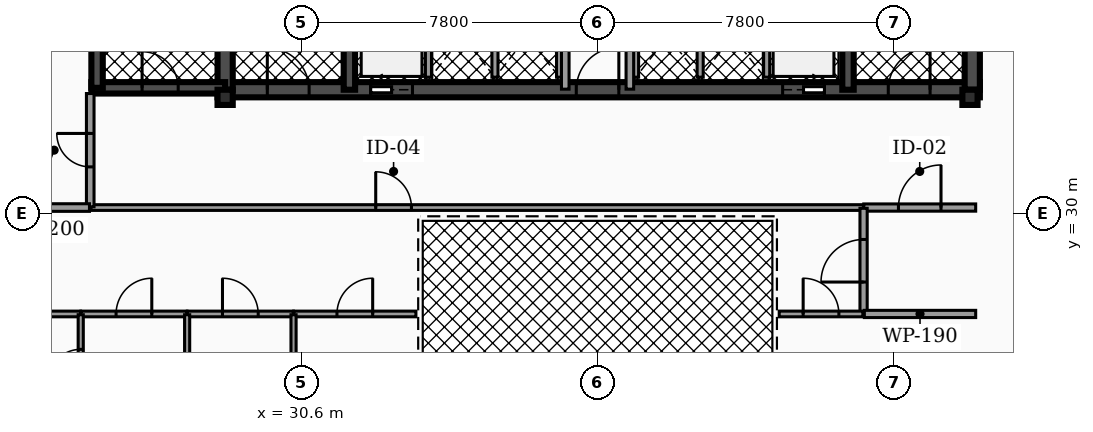
"""IFC4 building model, lengths in metres.
Left out: names, types, materials, properties, quantities, classifications, styles, units other than length and angle.
Written with IfcOpenShell. Run it as: python <this file> out.ifc"""

import sys

from ifc_helpers import new_model, si_unit, direction, frame, frame_2d, origin, origin_2d, place, context, subcontext, project, spatial, rectangle, hollow_rectangle, extrude, element, fill, save


model = new_model("IFC4")
c1 = context("Model", 3, precision=1e-05, world=origin(), true_north=direction((0.0, 1.0)))
c2 = subcontext(c1, "Body", "Model", "MODEL_VIEW")
j1 = project(units=[si_unit("LENGTHUNIT", "METRE"), si_unit("PLANEANGLEUNIT", "RADIAN")], contexts=[c1])
p1 = place(None, origin())
s1 = spatial("IfcSite", under=j1, at=p1, CompositionType="ELEMENT")
p2 = place(p1, origin())
s2 = spatial("IfcBuilding", under=s1, at=p2, CompositionType="ELEMENT")
p3 = place(p2, frame((0.0, 0.0, 18.36)))
s3 = spatial("IfcBuildingStorey", under=s2, at=p3, CompositionType="ELEMENT", Elevation=18.36)
p4 = place(p3, frame((28.4, 33.25, 0.0), z_axis=(0.0, 0.0, 1.0), x_axis=(1.0, 0.0, 0.0)))
e1 = element("IfcWall", 1, at=p4, inside=s3, PredefinedType="SHEAR", context=c2, shape_type="SweptSolid", body=[
    extrude(rectangle(XDim=20.06, YDim=0.4, at=frame_2d((10.03, 0.0))), origin(), (0.0, 0.0, 1.0), 4.07),
])
p5 = place(p4, frame((4.03, 0.0, 0.0)))
e2 = element("IfcOpeningElement", 2, at=p5, cuts=e1, PredefinedType="OPENING", context=c2, shape_type="SweptSolid", body=[
    extrude(rectangle(XDim=1.1, YDim=2.15, at=frame_2d((0.55, 1.075))), frame((0.0, 0.21, 0.0), z_axis=(0.0, -1.0, 0.0), x_axis=(1.0, 0.0, 0.0)), (0.0, 0.0, 1.0), 0.42),
])
p6 = place(p4, frame((14.87, 0.0, 0.0)))
e3 = element("IfcOpeningElement", 3, at=p6, cuts=e1, PredefinedType="OPENING", context=c2, shape_type="SweptSolid", body=[
    extrude(rectangle(XDim=1.1, YDim=2.15, at=frame_2d((0.55, 1.075))), frame((0.0, 0.21, 0.0), z_axis=(0.0, -1.0, 0.0), x_axis=(1.0, 0.0, 0.0)), (0.0, 0.0, 1.0), 0.42),
])
p7 = place(p4, frame((1.31, 0.0, 0.0)))
e4 = element("IfcOpeningElement", 4, at=p7, cuts=e1, PredefinedType="OPENING", context=c2, shape_type="SweptSolid", body=[
    extrude(rectangle(XDim=1.1, YDim=2.2, at=frame_2d((0.55, 1.1))), frame((0.0, 0.21, 0.0), z_axis=(0.0, -1.0, 0.0), x_axis=(1.0, 0.0, 0.0)), (0.0, 0.0, 1.0), 0.42),
])
p8 = place(p4, frame((9.44, 0.0, 0.0)))
e5 = element("IfcOpeningElement", 5, at=p8, cuts=e1, PredefinedType="OPENING", context=c2, shape_type="SweptSolid", body=[
    extrude(rectangle(XDim=1.12, YDim=2.05, at=frame_2d((0.56, 1.025))), frame((0.0, 0.21, 0.0), z_axis=(0.0, -1.0, 0.0), x_axis=(1.0, 0.0, 0.0)), (0.0, 0.0, 1.0), 0.42),
])
p9 = place(p4, frame((17.65, 0.0, 0.0)))
e6 = element("IfcOpeningElement", 6, at=p9, cuts=e1, PredefinedType="OPENING", context=c2, shape_type="SweptSolid", body=[
    extrude(rectangle(XDim=1.1, YDim=2.2, at=frame_2d((0.55, 1.1))), frame((0.0, 0.21, 0.0), z_axis=(0.0, -1.0, 0.0), x_axis=(1.0, 0.0, 0.0)), (0.0, 0.0, 1.0), 0.42),
])
p10 = place(p3, frame((28.6, 33.25, 0.0), z_axis=(0.0, 0.0, 1.0), x_axis=(0.0, 1.0, 0.0)))
e7 = element("IfcWall", 7, at=p10, inside=s3, PredefinedType="SHEAR", context=c2, shape_type="SweptSolid", body=[
    extrude(rectangle(XDim=10.2, YDim=0.4, at=frame_2d((5.1, 0.0))), origin(), (0.0, 0.0, 1.0), 4.07),
])
for number, where, z_axis, x_axis in (
    (8, (31.87, 33.25, 0.0), (0.0, 0.0, 1.0), (0.0, 1.0, 0.0)),
    (9, (44.99, 33.25, 0.0), (0.0, 0.0, 1.0), (0.0, 1.0, 0.0)),
):
    element("IfcWall", number, at=place(p3, frame(where, z_axis=z_axis, x_axis=x_axis)), inside=s3, PredefinedType="SHEAR", context=c2, shape_type="SweptSolid", body=[
        extrude(rectangle(XDim=10.2, YDim=0.3, at=frame_2d((5.1, 0.0))), origin(), (0.0, 0.0, 1.0), 4.07),
    ])
p11 = place(p3, frame((48.26, 33.25, 0.0), z_axis=(0.0, 0.0, 1.0), x_axis=(0.0, 1.0, 0.0)))
e10 = element("IfcWall", 10, at=p11, inside=s3, PredefinedType="SHEAR", context=c2, shape_type="SweptSolid", body=[
    extrude(rectangle(XDim=10.2, YDim=0.4, at=frame_2d((5.1, 0.0))), origin(), (0.0, 0.0, 1.0), 4.07),
])
p12 = place(p3, frame((25.08, 33.3, 0.0), z_axis=(0.0, 0.0, 1.0), x_axis=(1.0, 0.0, 0.0)))
e11 = element("IfcWall", 11, at=p12, inside=s3, PredefinedType="SHEAR", context=c2, shape_type="SweptSolid", body=[
    extrude(rectangle(XDim=3.52, YDim=0.3, at=frame_2d((1.76, 0.0))), origin(), (0.0, 0.0, 1.0), 4.07),
])
p13 = place(p12, frame((1.335, 0.0, 0.0)))
e12 = element("IfcOpeningElement", 12, at=p13, cuts=e11, PredefinedType="OPENING", context=c2, shape_type="SweptSolid", body=[
    extrude(rectangle(XDim=0.95, YDim=2.2, at=frame_2d((0.475, 1.1))), frame((0.0, 0.16, 0.0), z_axis=(0.0, -1.0, 0.0), x_axis=(1.0, 0.0, 0.0)), (0.0, 0.0, 1.0), 0.32),
])
p14 = place(p3, frame((25.23, 33.3, 0.0), z_axis=(0.0, 0.0, 1.0), x_axis=(0.0, 1.0, 0.0)))
e13 = element("IfcWall", 13, at=p14, inside=s3, PredefinedType="SHEAR", context=c2, shape_type="SweptSolid", body=[
    extrude(rectangle(XDim=7.6, YDim=0.3, at=frame_2d((3.8, 0.0))), origin(), (0.0, 0.0, 1.0), 4.07),
])
for number, where, z_axis, x_axis in (
    (14, (28.6, 33.05, 0.0), (0.0, 0.0, 1.0), (1.0, 0.0, 0.0)),
    (15, (48.2, 33.05, 0.0), (0.0, 0.0, 1.0), (1.0, 0.0, 0.0)),
):
    element("IfcColumn", number, at=place(p3, frame(where, z_axis=z_axis, x_axis=x_axis)), inside=s3, PredefinedType="PILASTER", context=c2, shape_type="SweptSolid", body=[
        extrude(hollow_rectangle(XDim=0.4, YDim=0.4, WallThickness=0.02, at=origin_2d()), origin(), (0.0, 0.0, 1.0), 4.07),
    ])
for number, where, z_axis, x_axis in (
    (16, (33.95, 33.58, 0.0), (0.0, 0.0, 1.0), (0.0, 1.0, 0.0)),
    (17, (42.85, 33.58, 0.0), (0.0, 0.0, 1.0), (0.0, 1.0, 0.0)),
):
    element("IfcWall", number, at=place(p3, frame(where, z_axis=z_axis, x_axis=x_axis)), inside=s3, PredefinedType="SOLIDWALL", context=c2, shape_type="SweptSolid", body=[
        extrude(rectangle(XDim=2.45, YDim=0.16, at=frame_2d((1.225, 0.0))), origin(), (0.0, 0.0, 1.0), 3.042),
    ])
for number, where, z_axis, x_axis in (
    (18, (35.7, 33.58, 0.0), (0.0, 0.0, 1.0), (0.0, 1.0, 0.0)),
    (19, (37.4, 33.58, 0.0), (0.0, 0.0, 1.0), (0.0, 1.0, 0.0)),
    (20, (39.4, 33.58, 0.0), (0.0, 0.0, 1.0), (0.0, 1.0, 0.0)),
    (21, (41.1, 33.58, 0.0), (0.0, 0.0, 1.0), (0.0, 1.0, 0.0)),
):
    element("IfcWall", number, at=place(p3, frame(where, z_axis=z_axis, x_axis=x_axis)), inside=s3, PredefinedType="SOLIDWALL", context=c2, shape_type="SweptSolid", body=[
        extrude(rectangle(XDim=2.25, YDim=0.16, at=frame_2d((1.125, 0.0))), origin(), (0.0, 0.0, 1.0), 3.042),
    ])
p15 = place(p3, frame((37.55, 33.265, 0.0), z_axis=(0.0, 0.0, 1.0), x_axis=(0.0, 1.0, 0.0)))
e22 = element("IfcWall", 22, at=p15, inside=s3, PredefinedType="PARTITIONING", context=c2, shape_type="SweptSolid", body=[
    extrude(rectangle(XDim=4.265, YDim=0.2, at=frame_2d((2.133, 0.0))), origin(), (0.0, 0.0, 1.0), 3.027),
])
p16 = place(p15, frame((3.093, 0.0, 0.0)))
e23 = element("IfcOpeningElement", 23, at=p16, cuts=e22, PredefinedType="OPENING", context=c2, shape_type="SweptSolid", body=[
    extrude(rectangle(XDim=0.88, YDim=2.05, at=frame_2d((0.44, 1.025))), frame((0.0, 0.11, 0.0), z_axis=(0.0, -1.0, 0.0), x_axis=(1.0, 0.0, 0.0)), (0.0, 0.0, 1.0), 0.22),
])
p17 = place(p3, frame((39.25, 33.265, 0.0), z_axis=(0.0, 0.0, 1.0), x_axis=(0.0, 1.0, 0.0)))
e24 = element("IfcWall", 24, at=p17, inside=s3, PredefinedType="PARTITIONING", context=c2, shape_type="SweptSolid", body=[
    extrude(rectangle(XDim=4.265, YDim=0.2, at=frame_2d((2.133, 0.0))), origin(), (0.0, 0.0, 1.0), 3.027),
])
p18 = place(p17, frame((3.093, 0.0, 0.0)))
e25 = element("IfcOpeningElement", 25, at=p18, cuts=e24, PredefinedType="OPENING", context=c2, shape_type="SweptSolid", body=[
    extrude(rectangle(XDim=0.88, YDim=2.05, at=frame_2d((0.44, 1.025))), frame((0.0, 0.11, 0.0), z_axis=(0.0, -1.0, 0.0), x_axis=(1.0, 0.0, 0.0)), (0.0, 0.0, 1.0), 0.22),
])
p19 = place(p3, frame((45.405, 30.15, 0.0), z_axis=(0.0, 0.0, 1.0), x_axis=(1.0, 0.0, 0.0)))
e26 = element("IfcWall", 26, at=p19, inside=s3, PredefinedType="PARTITIONING", context=c2, shape_type="SweptSolid", body=[
    extrude(rectangle(XDim=2.945, YDim=0.19, at=frame_2d((1.473, 0.0))), origin(), (0.0, 0.0, 1.0), 3.027),
])
p20 = place(p19, frame((0.913, 0.0, 0.0)))
e27 = element("IfcOpeningElement", 27, at=p20, cuts=e26, PredefinedType="OPENING", context=c2, shape_type="SweptSolid", body=[
    extrude(rectangle(XDim=1.12, YDim=2.05, at=frame_2d((0.56, 1.025))), frame((0.0, 0.105, 0.0), z_axis=(0.0, -1.0, 0.0), x_axis=(1.0, 0.0, 0.0)), (0.0, 0.0, 1.0), 0.21),
])
p21 = place(p3, frame((25.07, 30.15, 0.0), z_axis=(0.0, 0.0, 1.0), x_axis=(1.0, 0.0, 0.0)))
e28 = element("IfcWall", 28, at=p21, inside=s3, PredefinedType="PARTITIONING", context=c2, shape_type="SweptSolid", body=[
    extrude(rectangle(XDim=20.325, YDim=0.15, at=frame_2d((10.163, 0.0))), origin(), (0.0, 0.0, 1.0), 3.027),
])
p22 = place(p21, frame((7.492, 0.0, 0.0)))
e29 = element("IfcOpeningElement", 29, at=p22, cuts=e28, PredefinedType="OPENING", context=c2, shape_type="SweptSolid", body=[
    extrude(rectangle(XDim=0.94, YDim=2.05, at=frame_2d((0.47, 1.025))), frame((0.0, 0.085, 0.0), z_axis=(0.0, -1.0, 0.0), x_axis=(1.0, 0.0, 0.0)), (0.0, 0.0, 1.0), 0.17),
])
p23 = place(p3, frame((25.05, 30.17, 0.0), z_axis=(0.0, 0.0, 1.0), x_axis=(0.0, 1.0, 0.0)))
e30 = element("IfcWall", 30, at=p23, inside=s3, PredefinedType="PARTITIONING", context=c2, shape_type="SweptSolid", body=[
    extrude(rectangle(XDim=2.98, YDim=0.2, at=frame_2d((1.49, 0.0))), origin(), (0.0, 0.0, 1.0), 3.027),
])
p24 = place(p23, frame((1.05, 0.0, 0.0)))
e31 = element("IfcOpeningElement", 31, at=p24, cuts=e30, PredefinedType="OPENING", context=c2, shape_type="SweptSolid", body=[
    extrude(rectangle(XDim=0.88, YDim=2.05, at=frame_2d((0.44, 1.025))), frame((0.0, 0.11, 0.0), z_axis=(0.0, -1.0, 0.0), x_axis=(1.0, 0.0, 0.0)), (0.0, 0.0, 1.0), 0.22),
])
p25 = place(p3, frame((45.4, 27.37, 0.0), z_axis=(0.0, 0.0, 1.0), x_axis=(0.0, 1.0, 0.0)))
e32 = element("IfcWall", 32, at=p25, inside=s3, PredefinedType="PARTITIONING", context=c2, shape_type="SweptSolid", body=[
    extrude(rectangle(XDim=2.76, YDim=0.19, at=frame_2d((1.38, 0.0))), origin(), (0.0, 0.0, 1.0), 3.027),
])
p26 = place(p25, frame((0.82, 0.0, 0.0)))
e33 = element("IfcOpeningElement", 33, at=p26, cuts=e32, PredefinedType="OPENING", context=c2, shape_type="SweptSolid", body=[
    extrude(rectangle(XDim=1.12, YDim=2.05, at=frame_2d((0.56, 1.025))), frame((0.0, 0.105, 0.0), z_axis=(0.0, -1.0, 0.0), x_axis=(1.0, 0.0, 0.0)), (0.0, 0.0, 1.0), 0.21),
])
p27 = place(p3, frame((45.42, 27.35, 0.0), z_axis=(0.0, 0.0, 1.0), x_axis=(1.0, 0.0, 0.0)))
e34 = element("IfcWall", 34, at=p27, inside=s3, PredefinedType="PARTITIONING", context=c2, shape_type="SweptSolid", body=[
    extrude(rectangle(XDim=2.93, YDim=0.19, at=frame_2d((1.465, 0.0))), origin(), (0.0, 0.0, 1.0), 3.027),
])
p28 = place(p3, frame((22.8, 27.35, 0.0), z_axis=(0.0, 0.0, 1.0), x_axis=(1.0, 0.0, 0.0)))
e35 = element("IfcWall", 35, at=p28, inside=s3, PredefinedType="PARTITIONING", context=c2, shape_type="SweptSolid", body=[
    extrude(rectangle(XDim=1.995, YDim=0.15, at=frame_2d((0.998, 0.0))), origin(), (0.0, 0.0, 1.0), 3.027),
])
p29 = place(p3, frame((24.805, 27.35, 0.0), z_axis=(0.0, 0.0, 1.0), x_axis=(1.0, 0.0, 0.0)))
e36 = element("IfcWall", 36, at=p29, inside=s3, PredefinedType="PARTITIONING", context=c2, shape_type="SweptSolid", body=[
    extrude(rectangle(XDim=2.79, YDim=0.15, at=frame_2d((1.395, 0.0))), origin(), (0.0, 0.0, 1.0), 3.027),
])
p30 = place(p29, frame((0.925, 0.0, 0.0)))
e37 = element("IfcOpeningElement", 37, at=p30, cuts=e36, PredefinedType="OPENING", context=c2, shape_type="SweptSolid", body=[
    extrude(rectangle(XDim=0.94, YDim=2.05, at=frame_2d((0.47, 1.025))), frame((0.0, 0.085, 0.0), z_axis=(0.0, -1.0, 0.0), x_axis=(1.0, 0.0, 0.0)), (0.0, 0.0, 1.0), 0.17),
])
p31 = place(p3, frame((27.605, 27.35, 0.0), z_axis=(0.0, 0.0, 1.0), x_axis=(1.0, 0.0, 0.0)))
e38 = element("IfcWall", 38, at=p31, inside=s3, PredefinedType="PARTITIONING", context=c2, shape_type="SweptSolid", body=[
    extrude(rectangle(XDim=2.79, YDim=0.15, at=frame_2d((1.395, 0.0))), origin(), (0.0, 0.0, 1.0), 3.027),
])
p32 = place(p31, frame((0.925, 0.0, 0.0)))
e39 = element("IfcOpeningElement", 39, at=p32, cuts=e38, PredefinedType="OPENING", context=c2, shape_type="SweptSolid", body=[
    extrude(rectangle(XDim=0.94, YDim=2.05, at=frame_2d((0.47, 1.025))), frame((0.0, 0.085, 0.0), z_axis=(0.0, -1.0, 0.0), x_axis=(1.0, 0.0, 0.0)), (0.0, 0.0, 1.0), 0.17),
])
p33 = place(p3, frame((30.405, 27.35, 0.0), z_axis=(0.0, 0.0, 1.0), x_axis=(1.0, 0.0, 0.0)))
e40 = element("IfcWall", 40, at=p33, inside=s3, PredefinedType="PARTITIONING", context=c2, shape_type="SweptSolid", body=[
    extrude(rectangle(XDim=3.215, YDim=0.15, at=frame_2d((1.607, 0.0))), origin(), (0.0, 0.0, 1.0), 3.027),
])
p34 = place(p33, frame((1.137, 0.0, 0.0)))
e41 = element("IfcOpeningElement", 41, at=p34, cuts=e40, PredefinedType="OPENING", context=c2, shape_type="SweptSolid", body=[
    extrude(rectangle(XDim=0.94, YDim=2.05, at=frame_2d((0.47, 1.025))), frame((0.0, 0.085, 0.0), z_axis=(0.0, -1.0, 0.0), x_axis=(1.0, 0.0, 0.0)), (0.0, 0.0, 1.0), 0.17),
])
p35 = place(p3, frame((43.18, 27.35, 0.0), z_axis=(0.0, 0.0, 1.0), x_axis=(1.0, 0.0, 0.0)))
e42 = element("IfcWall", 42, at=p35, inside=s3, PredefinedType="PARTITIONING", context=c2, shape_type="SweptSolid", body=[
    extrude(rectangle(XDim=2.2, YDim=0.15, at=frame_2d((1.1, 0.0))), origin(), (0.0, 0.0, 1.0), 3.027),
])
p36 = place(p35, frame((0.63, 0.0, 0.0)))
e43 = element("IfcOpeningElement", 43, at=p36, cuts=e42, PredefinedType="OPENING", context=c2, shape_type="SweptSolid", body=[
    extrude(rectangle(XDim=0.94, YDim=2.05, at=frame_2d((0.47, 1.025))), frame((0.0, 0.085, 0.0), z_axis=(0.0, -1.0, 0.0), x_axis=(1.0, 0.0, 0.0)), (0.0, 0.0, 1.0), 0.17),
])
p37 = place(p3, frame((22.8, 30.15, 0.0), z_axis=(0.0, 0.0, 1.0), x_axis=(1.0, 0.0, 0.0)))
e44 = element("IfcWall", 44, at=p37, inside=s3, PredefinedType="PARTITIONING", context=c2, shape_type="SweptSolid", body=[
    extrude(rectangle(XDim=2.23, YDim=0.2, at=frame_2d((1.115, 0.0))), origin(), (0.0, 0.0, 1.0), 3.027),
])
p38 = place(p3, frame((24.8, 23.848, 0.0), z_axis=(0.0, 0.0, 1.0), x_axis=(0.0, 1.0, 0.0)))
e45 = element("IfcWall", 45, at=p38, inside=s3, PredefinedType="PARTITIONING", context=c2, shape_type="SweptSolid", body=[
    extrude(rectangle(XDim=3.482, YDim=0.135, at=frame_2d((1.741, 0.0))), origin(), (0.0, 0.0, 1.0), 3.027),
])
p39 = place(p38, frame((1.711, 0.0, 0.0)))
e46 = element("IfcOpeningElement", 46, at=p39, cuts=e45, PredefinedType="OPENING", context=c2, shape_type="SweptSolid", body=[
    extrude(rectangle(XDim=0.86, YDim=2.05, at=frame_2d((0.43, 1.025))), frame((0.0, 0.077, 0.0), z_axis=(0.0, -1.0, 0.0), x_axis=(1.0, 0.0, 0.0)), (0.0, 0.0, 1.0), 0.155),
])
for number, where, z_axis, x_axis in (
    (47, (27.6, 23.82, 0.0), (0.0, 0.0, 1.0), (0.0, 1.0, 0.0)),
    (48, (30.4, 23.82, 0.0), (0.0, 0.0, 1.0), (0.0, 1.0, 0.0)),
):
    element("IfcWall", number, at=place(p3, frame(where, z_axis=z_axis, x_axis=x_axis)), inside=s3, PredefinedType="PARTITIONING", context=c2, shape_type="SweptSolid", body=[
        extrude(rectangle(XDim=3.51, YDim=0.135, at=frame_2d((1.755, 0.0))), origin(), (0.0, 0.0, 1.0), 3.027),
    ])
p40 = place(p5, origin())
e49 = element("IfcDoor", 49, at=p40, inside=s3, OperationType="SLIDING_TO_LEFT", PredefinedType="DOOR", context=c2, shape_type="SweptSolid", body=[
    extrude(rectangle(XDim=1.1, YDim=2.15, at=frame_2d((0.55, 1.075))), frame((0.0, 0.025, 0.0), z_axis=(0.0, -1.0, 0.0), x_axis=(1.0, 0.0, 0.0)), (0.0, 0.0, 1.0), 0.05),
])
fill(e2, e49)
p41 = place(p6, origin())
e50 = element("IfcDoor", 50, at=p41, inside=s3, OperationType="SLIDING_TO_RIGHT", PredefinedType="DOOR", context=c2, shape_type="SweptSolid", body=[
    extrude(rectangle(XDim=1.1, YDim=2.15, at=frame_2d((0.55, 1.075))), frame((0.0, 0.025, 0.0), z_axis=(0.0, -1.0, 0.0), x_axis=(1.0, 0.0, 0.0)), (0.0, 0.0, 1.0), 0.05),
])
fill(e3, e50)
p42 = place(p7, origin())
e51 = element("IfcDoor", 51, at=p42, inside=s3, OperationType="SINGLE_SWING_LEFT", PredefinedType="DOOR", context=c2, shape_type="SweptSolid", body=[
    extrude(rectangle(XDim=1.1, YDim=2.2, at=frame_2d((0.55, 1.1))), frame((0.0, 0.025, 0.0), z_axis=(0.0, -1.0, 0.0), x_axis=(1.0, 0.0, 0.0)), (0.0, 0.0, 1.0), 0.05),
])
fill(e4, e51)
p43 = place(p8, origin())
e52 = element("IfcDoor", 52, at=p43, inside=s3, OperationType="SINGLE_SWING_RIGHT", PredefinedType="DOOR", context=c2, shape_type="SweptSolid", body=[
    extrude(rectangle(XDim=1.12, YDim=2.05, at=frame_2d((0.56, 1.025))), frame((0.0, 0.025, 0.0), z_axis=(0.0, -1.0, 0.0), x_axis=(1.0, 0.0, 0.0)), (0.0, 0.0, 1.0), 0.05),
])
fill(e5, e52)
p44 = place(p9, origin())
e53 = element("IfcDoor", 53, at=p44, inside=s3, OperationType="SINGLE_SWING_RIGHT", PredefinedType="DOOR", context=c2, shape_type="SweptSolid", body=[
    extrude(rectangle(XDim=1.1, YDim=2.2, at=frame_2d((0.55, 1.1))), frame((0.0, 0.025, 0.0), z_axis=(0.0, -1.0, 0.0), x_axis=(1.0, 0.0, 0.0)), (0.0, 0.0, 1.0), 0.05),
])
fill(e6, e53)
p45 = place(p13, origin())
e54 = element("IfcDoor", 54, at=p45, inside=s3, OperationType="SINGLE_SWING_LEFT", PredefinedType="DOOR", context=c2, shape_type="SweptSolid", body=[
    extrude(rectangle(XDim=0.95, YDim=2.2, at=frame_2d((0.475, 1.1))), frame((0.0, 0.025, 0.0), z_axis=(0.0, -1.0, 0.0), x_axis=(1.0, 0.0, 0.0)), (0.0, 0.0, 1.0), 0.05),
])
fill(e12, e54)
p46 = place(p20, origin())
e55 = element("IfcDoor", 55, at=p46, inside=s3, OperationType="SINGLE_SWING_RIGHT", PredefinedType="DOOR", context=c2, shape_type="SweptSolid", body=[
    extrude(rectangle(XDim=1.12, YDim=2.05, at=frame_2d((0.56, 1.025))), frame((0.0, 0.025, 0.0), z_axis=(0.0, -1.0, 0.0), x_axis=(1.0, 0.0, 0.0)), (0.0, 0.0, 1.0), 0.05),
])
fill(e27, e55)
p47 = place(p22, origin())
e56 = element("IfcDoor", 56, at=p47, inside=s3, OperationType="SINGLE_SWING_LEFT", PredefinedType="DOOR", context=c2, shape_type="SweptSolid", body=[
    extrude(rectangle(XDim=0.94, YDim=2.05, at=frame_2d((0.47, 1.025))), frame((0.0, 0.025, 0.0), z_axis=(0.0, -1.0, 0.0), x_axis=(1.0, 0.0, 0.0)), (0.0, 0.0, 1.0), 0.05),
])
fill(e29, e56)
p48 = place(p24, origin())
e57 = element("IfcDoor", 57, at=p48, inside=s3, OperationType="SINGLE_SWING_RIGHT", PredefinedType="DOOR", context=c2, shape_type="SweptSolid", body=[
    extrude(rectangle(XDim=0.88, YDim=2.05, at=frame_2d((0.44, 1.025))), frame((0.0, 0.025, 0.0), z_axis=(0.0, -1.0, 0.0), x_axis=(1.0, 0.0, 0.0)), (0.0, 0.0, 1.0), 0.05),
])
fill(e31, e57)
p49 = place(p26, origin())
e58 = element("IfcDoor", 58, at=p49, inside=s3, OperationType="SINGLE_SWING_LEFT", PredefinedType="DOOR", context=c2, shape_type="SweptSolid", body=[
    extrude(rectangle(XDim=1.12, YDim=2.05, at=frame_2d((0.56, 1.025))), frame((0.0, 0.025, 0.0), z_axis=(0.0, -1.0, 0.0), x_axis=(1.0, 0.0, 0.0)), (0.0, 0.0, 1.0), 0.05),
])
fill(e33, e58)
p50 = place(p30, origin())
e59 = element("IfcDoor", 59, at=p50, inside=s3, OperationType="SINGLE_SWING_RIGHT", PredefinedType="DOOR", context=c2, shape_type="SweptSolid", body=[
    extrude(rectangle(XDim=0.94, YDim=2.05, at=frame_2d((0.47, 1.025))), frame((0.0, 0.025, 0.0), z_axis=(0.0, -1.0, 0.0), x_axis=(1.0, 0.0, 0.0)), (0.0, 0.0, 1.0), 0.05),
])
fill(e37, e59)
p51 = place(p32, origin())
e60 = element("IfcDoor", 60, at=p51, inside=s3, OperationType="SINGLE_SWING_LEFT", PredefinedType="DOOR", context=c2, shape_type="SweptSolid", body=[
    extrude(rectangle(XDim=0.94, YDim=2.05, at=frame_2d((0.47, 1.025))), frame((0.0, 0.025, 0.0), z_axis=(0.0, -1.0, 0.0), x_axis=(1.0, 0.0, 0.0)), (0.0, 0.0, 1.0), 0.05),
])
fill(e39, e60)
p52 = place(p34, origin())
e61 = element("IfcDoor", 61, at=p52, inside=s3, OperationType="SINGLE_SWING_RIGHT", PredefinedType="DOOR", context=c2, shape_type="SweptSolid", body=[
    extrude(rectangle(XDim=0.94, YDim=2.05, at=frame_2d((0.47, 1.025))), frame((0.0, 0.025, 0.0), z_axis=(0.0, -1.0, 0.0), x_axis=(1.0, 0.0, 0.0)), (0.0, 0.0, 1.0), 0.05),
])
fill(e41, e61)
p53 = place(p36, origin())
e62 = element("IfcDoor", 62, at=p53, inside=s3, OperationType="SINGLE_SWING_LEFT", PredefinedType="DOOR", context=c2, shape_type="SweptSolid", body=[
    extrude(rectangle(XDim=0.94, YDim=2.05, at=frame_2d((0.47, 1.025))), frame((0.0, 0.025, 0.0), z_axis=(0.0, -1.0, 0.0), x_axis=(1.0, 0.0, 0.0)), (0.0, 0.0, 1.0), 0.05),
])
fill(e43, e62)
p54 = place(p39, origin())
e63 = element("IfcDoor", 63, at=p54, inside=s3, OperationType="SINGLE_SWING_LEFT", PredefinedType="DOOR", context=c2, shape_type="SweptSolid", body=[
    extrude(rectangle(XDim=0.86, YDim=2.05, at=frame_2d((0.43, 1.025))), frame((0.0, 0.025, 0.0), z_axis=(0.0, -1.0, 0.0), x_axis=(1.0, 0.0, 0.0)), (0.0, 0.0, 1.0), 0.05),
])
fill(e46, e63)
save(model, sys.argv[1])
